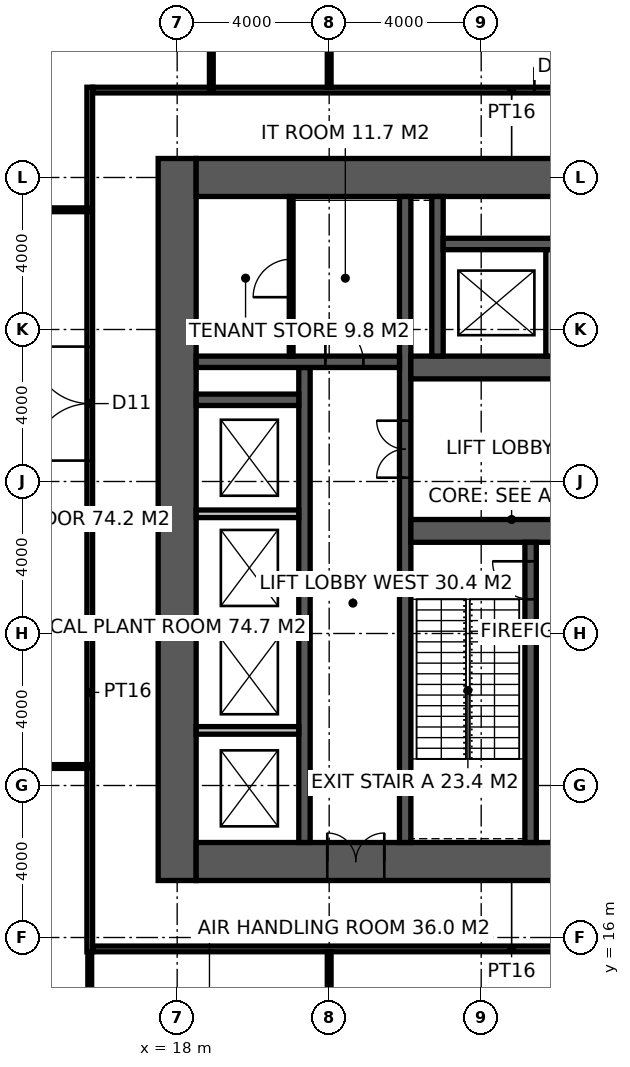
"""IFC4 building model, lengths in metres.
Left out: names, types, materials, properties, quantities, classifications, styles, units other than length and angle.
Written with IfcOpenShell. Run it as: python <this file> out.ifc"""

import sys

from ifc_helpers import new_model, si_unit, direction, frame, frame_2d, origin, place, context, subcontext, project, spatial, rectangle, extrude, element, fill, save


model = new_model("IFC4")
c1 = context("Model", 3, precision=1e-05, world=origin(), true_north=direction((0.0, 1.0)))
c2 = subcontext(c1, "Body", "Model", "MODEL_VIEW")
j1 = project(units=[si_unit("LENGTHUNIT", "METRE"), si_unit("PLANEANGLEUNIT", "RADIAN")], contexts=[c1])
p1 = place(None, origin())
s1 = spatial("IfcSite", under=j1, at=p1, CompositionType="ELEMENT")
p2 = place(p1, origin())
s2 = spatial("IfcBuilding", under=s1, at=p2, CompositionType="ELEMENT")
p3 = place(p2, frame((0.0, 0.0, 71.0)))
s3 = spatial("IfcBuildingStorey", under=s2, at=p3, CompositionType="ELEMENT", Elevation=71.0)
p4 = place(p3, frame((18.0, 17.5, -0.15), z_axis=(0.0, 0.0, 1.0), x_axis=(0.0, 1.0, 0.0)))
e1 = element("IfcWall", 1, at=p4, inside=s3, PredefinedType="SHEAR", context=c2, shape_type="SweptSolid", body=[
    extrude(rectangle(XDim=19.0, YDim=1.0, at=frame_2d((9.5, 0.0))), origin(), (0.0, 0.0, 1.0), 5.4),
])
p5 = place(p3, frame((18.5, 18.0, -0.15), z_axis=(0.0, 0.0, 1.0), x_axis=(1.0, 0.0, 0.0)))
e2 = element("IfcWall", 2, at=p5, inside=s3, PredefinedType="SHEAR", context=c2, shape_type="SweptSolid", body=[
    extrude(rectangle(XDim=17.6, YDim=1.0, at=frame_2d((8.8, 0.0))), origin(), (0.0, 0.0, 1.0), 5.4),
])
p6 = place(p5, frame((3.45, 0.0, 0.15)))
e3 = element("IfcOpeningElement", 3, at=p6, cuts=e2, PredefinedType="OPENING", context=c2, shape_type="SweptSolid", body=[
    extrude(rectangle(XDim=1.5, YDim=2.4, at=frame_2d((0.75, 1.2))), frame((0.0, 0.51, 0.0), z_axis=(0.0, -1.0, 0.0), x_axis=(1.0, 0.0, 0.0)), (0.0, 0.0, 1.0), 1.02),
])
p7 = place(p3, frame((18.5, 36.0, -0.15), z_axis=(0.0, 0.0, 1.0), x_axis=(1.0, 0.0, 0.0)))
e4 = element("IfcWall", 4, at=p7, inside=s3, PredefinedType="SHEAR", context=c2, shape_type="SweptSolid", body=[
    extrude(rectangle(XDim=17.6, YDim=1.0, at=frame_2d((8.8, 0.0))), origin(), (0.0, 0.0, 1.0), 5.4),
])
p8 = place(p3, frame((24.0, 18.5, -0.15), z_axis=(0.0, 0.0, 1.0), x_axis=(0.0, 1.0, 0.0)))
e5 = element("IfcWall", 5, at=p8, inside=s3, PredefinedType="SHEAR", context=c2, shape_type="SweptSolid", body=[
    extrude(rectangle(XDim=17.0, YDim=0.3, at=frame_2d((8.5, 0.0))), origin(), (0.0, 0.0, 1.0), 5.4),
])
p9 = place(p8, frame((9.6, 0.0, 0.15)))
e6 = element("IfcOpeningElement", 6, at=p9, cuts=e5, PredefinedType="OPENING", context=c2, shape_type="SweptSolid", body=[
    extrude(rectangle(XDim=1.5, YDim=2.4, at=frame_2d((0.75, 1.2))), frame((0.0, 0.16, 0.0), z_axis=(0.0, -1.0, 0.0), x_axis=(1.0, 0.0, 0.0)), (0.0, 0.0, 1.0), 0.32),
])
p10 = place(p3, frame((24.15, 26.7, -0.15), z_axis=(0.0, 0.0, 1.0), x_axis=(1.0, 0.0, 0.0)))
e7 = element("IfcWall", 7, at=p10, inside=s3, PredefinedType="SHEAR", context=c2, shape_type="SweptSolid", body=[
    extrude(rectangle(XDim=11.25, YDim=0.6, at=frame_2d((5.625, 0.0))), origin(), (0.0, 0.0, 1.0), 5.4),
])
p11 = place(p10, frame((9.25, 0.0, 0.15)))
e8 = element("IfcOpeningElement", 8, at=p11, cuts=e7, PredefinedType="OPENING", context=c2, shape_type="SweptSolid", body=[
    extrude(rectangle(XDim=1.0, YDim=2.2, at=frame_2d((0.5, 1.1))), frame((0.0, 0.31, 0.0), z_axis=(0.0, -1.0, 0.0), x_axis=(1.0, 0.0, 0.0)), (0.0, 0.0, 1.0), 0.62),
])
p12 = place(p10, frame((4.9, 0.0, 0.15)))
e9 = element("IfcOpeningElement", 9, at=p12, cuts=e7, PredefinedType="OPENING", context=c2, shape_type="SweptSolid", body=[
    extrude(rectangle(XDim=1.5, YDim=2.4, at=frame_2d((0.75, 1.2))), frame((0.0, 0.31, 0.0), z_axis=(0.0, -1.0, 0.0), x_axis=(1.0, 0.0, 0.0)), (0.0, 0.0, 1.0), 0.62),
])
p13 = place(p3, frame((27.3, 18.5, -0.15), z_axis=(0.0, 0.0, 1.0), x_axis=(0.0, 1.0, 0.0)))
e10 = element("IfcWall", 10, at=p13, inside=s3, PredefinedType="SHEAR", context=c2, shape_type="SweptSolid", body=[
    extrude(rectangle(XDim=7.9, YDim=0.3, at=frame_2d((3.95, 0.0))), origin(), (0.0, 0.0, 1.0), 5.4),
])
p14 = place(p13, frame((6.4, 0.0, 0.15)))
e11 = element("IfcOpeningElement", 11, at=p14, cuts=e10, PredefinedType="OPENING", context=c2, shape_type="SweptSolid", body=[
    extrude(rectangle(XDim=1.0, YDim=2.2, at=frame_2d((0.5, 1.1))), frame((0.0, 0.16, 0.0), z_axis=(0.0, -1.0, 0.0), x_axis=(1.0, 0.0, 0.0)), (0.0, 0.0, 1.0), 0.32),
])
p15 = place(p3, frame((24.15, 31.0, -0.15), z_axis=(0.0, 0.0, 1.0), x_axis=(1.0, 0.0, 0.0)))
e12 = element("IfcWall", 12, at=p15, inside=s3, PredefinedType="SHEAR", context=c2, shape_type="SweptSolid", body=[
    extrude(rectangle(XDim=11.25, YDim=0.6, at=frame_2d((5.625, 0.0))), origin(), (0.0, 0.0, 1.0), 5.4),
])
p16 = place(p15, frame((7.25, 0.0, 0.15)))
e13 = element("IfcOpeningElement", 13, at=p16, cuts=e12, PredefinedType="OPENING", context=c2, shape_type="SweptSolid", body=[
    extrude(rectangle(XDim=1.4, YDim=2.4, at=frame_2d((0.7, 1.2))), frame((0.0, 0.31, 0.0), z_axis=(0.0, -1.0, 0.0), x_axis=(1.0, 0.0, 0.0)), (0.0, 0.0, 1.0), 0.62),
])
p17 = place(p3, frame((21.35, 18.5, -0.15), z_axis=(0.0, 0.0, 1.0), x_axis=(0.0, 1.0, 0.0)))
e14 = element("IfcWall", 14, at=p17, inside=s3, PredefinedType="SHEAR", context=c2, shape_type="SweptSolid", body=[
    extrude(rectangle(XDim=12.5, YDim=0.3, at=frame_2d((6.25, 0.0))), origin(), (0.0, 0.0, 1.0), 5.4),
])
p18 = place(p3, frame((18.5, 31.15, -0.15), z_axis=(0.0, 0.0, 1.0), x_axis=(1.0, 0.0, 0.0)))
e15 = element("IfcWall", 15, at=p18, inside=s3, PredefinedType="SHEAR", context=c2, shape_type="SweptSolid", body=[
    extrude(rectangle(XDim=5.35, YDim=0.3, at=frame_2d((2.675, 0.0))), origin(), (0.0, 0.0, 1.0), 5.4),
])
p19 = place(p18, frame((3.4, 0.0, 0.15)))
e16 = element("IfcOpeningElement", 16, at=p19, cuts=e15, PredefinedType="OPENING", context=c2, shape_type="SweptSolid", body=[
    extrude(rectangle(XDim=1.0, YDim=2.2, at=frame_2d((0.5, 1.1))), frame((0.0, 0.16, 0.0), z_axis=(0.0, -1.0, 0.0), x_axis=(1.0, 0.0, 0.0)), (0.0, 0.0, 1.0), 0.32),
])
p20 = place(p3, frame((18.5, 30.15, -0.15), z_axis=(0.0, 0.0, 1.0), x_axis=(1.0, 0.0, 0.0)))
e17 = element("IfcWall", 17, at=p20, inside=s3, PredefinedType="SHEAR", context=c2, shape_type="SweptSolid", body=[
    extrude(rectangle(XDim=2.7, YDim=0.3, at=frame_2d((1.35, 0.0))), origin(), (0.0, 0.0, 1.0), 5.4),
])
p21 = place(p3, frame((24.85, 31.3, -0.15), z_axis=(0.0, 0.0, 1.0), x_axis=(0.0, 1.0, 0.0)))
e18 = element("IfcWall", 18, at=p21, inside=s3, PredefinedType="SHEAR", context=c2, shape_type="SweptSolid", body=[
    extrude(rectangle(XDim=4.2, YDim=0.3, at=frame_2d((2.1, 0.0))), origin(), (0.0, 0.0, 1.0), 5.4),
])
p22 = place(p3, frame((25.0, 34.25, -0.15), z_axis=(0.0, 0.0, 1.0), x_axis=(1.0, 0.0, 0.0)))
e19 = element("IfcWall", 19, at=p22, inside=s3, PredefinedType="SHEAR", context=c2, shape_type="SweptSolid", body=[
    extrude(rectangle(XDim=8.6, YDim=0.3, at=frame_2d((4.3, 0.0))), origin(), (0.0, 0.0, 1.0), 5.4),
])
p23 = place(p3, frame((27.8, 31.3, -0.15), z_axis=(0.0, 0.0, 1.0), x_axis=(0.0, 1.0, 0.0)))
e20 = element("IfcWall", 20, at=p23, inside=s3, PredefinedType="SOLIDWALL", context=c2, shape_type="SweptSolid", body=[
    extrude(rectangle(XDim=2.8, YDim=0.2, at=frame_2d((1.4, 0.0))), origin(), (0.0, 0.0, 1.0), 5.4),
])
for number, where, z_axis, x_axis in (
    (21, (18.5, 21.45, 0.0), (0.0, 0.0, 1.0), (1.0, 0.0, 0.0)),
    (22, (18.5, 24.3, 0.0), (0.0, 0.0, 1.0), (1.0, 0.0, 0.0)),
    (23, (18.5, 27.15, 0.0), (0.0, 0.0, 1.0), (1.0, 0.0, 0.0)),
):
    element("IfcWall", number, at=place(p3, frame(where, z_axis=z_axis, x_axis=x_axis)), inside=s3, PredefinedType="SOLIDWALL", context=c2, shape_type="SweptSolid", body=[
        extrude(rectangle(XDim=2.7, YDim=0.2, at=frame_2d((1.35, 0.0))), origin(), (0.0, 0.0, 1.0), 5.25),
    ])
p24 = place(p3, frame((21.0, 31.3, 0.0), z_axis=(0.0, 0.0, 1.0), x_axis=(0.0, 1.0, 0.0)))
e24 = element("IfcWall", 24, at=p24, inside=s3, PredefinedType="PARTITIONING", context=c2, shape_type="SweptSolid", body=[
    extrude(rectangle(XDim=4.2, YDim=0.1, at=frame_2d((2.1, 0.0))), origin(), (0.0, 0.0, 1.0), 5.25),
])
p25 = place(p24, frame((1.55, 0.0, 0.0)))
e25 = element("IfcOpeningElement", 25, at=p25, cuts=e24, PredefinedType="OPENING", context=c2, shape_type="SweptSolid", body=[
    extrude(rectangle(XDim=1.0, YDim=2.2, at=frame_2d((0.5, 1.1))), frame((0.0, 0.06, 0.0), z_axis=(0.0, -1.0, 0.0), x_axis=(1.0, 0.0, 0.0)), (0.0, 0.0, 1.0), 0.12),
])
p26 = place(p3, frame((15.7, 15.625, 0.0), z_axis=(0.0, 0.0, 1.0), x_axis=(0.0, 1.0, 0.0)))
e26 = element("IfcWall", 26, at=p26, inside=s3, PredefinedType="PARTITIONING", context=c2, shape_type="SweptSolid", body=[
    extrude(rectangle(XDim=22.75, YDim=0.15, at=frame_2d((11.375, 0.0))), origin(), (0.0, 0.0, 1.0), 5.25),
])
p27 = place(p26, frame((12.925, 0.0, 0.0)))
e27 = element("IfcOpeningElement", 27, at=p27, cuts=e26, PredefinedType="OPENING", context=c2, shape_type="SweptSolid", body=[
    extrude(rectangle(XDim=3.0, YDim=3.3, at=frame_2d((1.5, 1.65))), frame((0.0, 0.085, 0.0), z_axis=(0.0, -1.0, 0.0), x_axis=(1.0, 0.0, 0.0)), (0.0, 0.0, 1.0), 0.17),
])
p28 = place(p3, frame((15.775, 15.7, 0.0), z_axis=(0.0, 0.0, 1.0), x_axis=(1.0, 0.0, 0.0)))
e28 = element("IfcWall", 28, at=p28, inside=s3, PredefinedType="PARTITIONING", context=c2, shape_type="SweptSolid", body=[
    extrude(rectangle(XDim=22.05, YDim=0.15, at=frame_2d((11.025, 0.0))), origin(), (0.0, 0.0, 1.0), 5.25),
])
p29 = place(p3, frame((15.775, 38.3, 0.0), z_axis=(0.0, 0.0, 1.0), x_axis=(1.0, 0.0, 0.0)))
e29 = element("IfcWall", 29, at=p29, inside=s3, PredefinedType="PARTITIONING", context=c2, shape_type="SweptSolid", body=[
    extrude(rectangle(XDim=22.05, YDim=0.15, at=frame_2d((11.025, 0.0))), origin(), (0.0, 0.0, 1.0), 5.25),
])
p30 = place(p29, frame((11.625, 0.0, 0.0)))
e30 = element("IfcOpeningElement", 30, at=p30, cuts=e29, PredefinedType="OPENING", context=c2, shape_type="SweptSolid", body=[
    extrude(rectangle(XDim=1.2, YDim=2.2, at=frame_2d((0.6, 1.1))), frame((0.0, 0.085, 0.0), z_axis=(0.0, -1.0, 0.0), x_axis=(1.0, 0.0, 0.0)), (0.0, 0.0, 1.0), 0.17),
])
p31 = place(p3, frame((22.0, 38.375, 0.0), z_axis=(0.0, 0.0, 1.0), x_axis=(0.0, 1.0, 0.0)))
e31 = element("IfcWall", 31, at=p31, inside=s3, PredefinedType="PARTITIONING", context=c2, shape_type="SweptSolid", body=[
    extrude(rectangle(XDim=3.675, YDim=0.1, at=frame_2d((1.837, 0.0))), origin(), (0.0, 0.0, 1.0), 4.35),
])
p32 = place(p3, frame((15.7, 9.75, 0.0), z_axis=(0.0, 0.0, 1.0), x_axis=(0.0, 1.0, 0.0)))
e32 = element("IfcWall", 32, at=p32, inside=s3, PredefinedType="PARTITIONING", context=c2, shape_type="SweptSolid", body=[
    extrude(rectangle(XDim=5.875, YDim=0.1, at=frame_2d((2.938, 0.0))), origin(), (0.0, 0.0, 1.0), 5.25),
])
p33 = place(p3, frame((22.0, 9.75, 0.0), z_axis=(0.0, 0.0, 1.0), x_axis=(0.0, 1.0, 0.0)))
e33 = element("IfcWall", 33, at=p33, inside=s3, PredefinedType="PARTITIONING", context=c2, shape_type="SweptSolid", body=[
    extrude(rectangle(XDim=5.875, YDim=0.1, at=frame_2d((2.938, 0.0))), origin(), (0.0, 0.0, 1.0), 4.35),
])
p34 = place(p3, frame((10.68, 20.5, 0.0), z_axis=(0.0, 0.0, 1.0), x_axis=(1.0, 0.0, 0.0)))
e34 = element("IfcWall", 34, at=p34, inside=s3, PredefinedType="PARTITIONING", context=c2, shape_type="SweptSolid", body=[
    extrude(rectangle(XDim=5.02, YDim=0.1, at=frame_2d((2.51, 0.0))), origin(), (0.0, 0.0, 1.0), 4.05),
])
p35 = place(p34, frame((1.51, 0.0, 0.0)))
e35 = element("IfcOpeningElement", 35, at=p35, cuts=e34, PredefinedType="OPENING", context=c2, shape_type="SweptSolid", body=[
    extrude(rectangle(XDim=2.0, YDim=2.4, at=frame_2d((1.0, 1.2))), frame((0.0, 0.06, 0.0), z_axis=(0.0, -1.0, 0.0), x_axis=(1.0, 0.0, 0.0)), (0.0, 0.0, 1.0), 0.12),
])
p36 = place(p3, frame((10.68, 35.15, 0.0), z_axis=(0.0, 0.0, 1.0), x_axis=(1.0, 0.0, 0.0)))
e36 = element("IfcWall", 36, at=p36, inside=s3, PredefinedType="PARTITIONING", context=c2, shape_type="SweptSolid", body=[
    extrude(rectangle(XDim=5.02, YDim=0.1, at=frame_2d((2.51, 0.0))), origin(), (0.0, 0.0, 1.0), 5.25),
])
p37 = place(p36, frame((1.51, 0.0, 0.0)))
e37 = element("IfcOpeningElement", 37, at=p37, cuts=e36, PredefinedType="OPENING", context=c2, shape_type="SweptSolid", body=[
    extrude(rectangle(XDim=2.0, YDim=2.4, at=frame_2d((1.0, 1.2))), frame((0.0, 0.06, 0.0), z_axis=(0.0, -1.0, 0.0), x_axis=(1.0, 0.0, 0.0)), (0.0, 0.0, 1.0), 0.12),
])
p38 = place(p3, frame((18.899, 47.32, 0.0), z_axis=(0.0, 0.0, 1.0), x_axis=(0.0, -1.0, 0.0)))
e38 = element("IfcWall", 38, at=p38, inside=s3, PredefinedType="PARTITIONING", context=c2, shape_type="SweptSolid", body=[
    extrude(rectangle(XDim=9.02, YDim=0.1, at=frame_2d((4.51, 0.0))), origin(), (0.0, 0.0, 1.0), 5.25),
])
p39 = place(p38, frame((3.91, 0.0, 0.0)))
e39 = element("IfcOpeningElement", 39, at=p39, cuts=e38, PredefinedType="OPENING", context=c2, shape_type="SweptSolid", body=[
    extrude(rectangle(XDim=2.0, YDim=2.4, at=frame_2d((1.0, 1.2))), frame((0.0, 0.06, 0.0), z_axis=(0.0, -1.0, 0.0), x_axis=(1.0, 0.0, 0.0)), (0.0, 0.0, 1.0), 0.12),
])
p40 = place(p14, origin())
e40 = element("IfcDoor", 40, at=p40, inside=s3, OperationType="SINGLE_SWING_RIGHT", PredefinedType="DOOR", context=c2, shape_type="SweptSolid", body=[
    extrude(rectangle(XDim=1.0, YDim=2.2, at=frame_2d((0.5, 1.1))), frame((0.0, 0.025, 0.0), z_axis=(0.0, -1.0, 0.0), x_axis=(1.0, 0.0, 0.0)), (0.0, 0.0, 1.0), 0.05),
])
fill(e11, e40)
p41 = place(p9, origin())
e41 = element("IfcDoor", 41, at=p41, inside=s3, OperationType="DOUBLE_DOOR_DOUBLE_SWING", PredefinedType="DOOR", context=c2, shape_type="SweptSolid", body=[
    extrude(rectangle(XDim=1.5, YDim=2.4, at=frame_2d((0.75, 1.2))), frame((0.0, 0.025, 0.0), z_axis=(0.0, -1.0, 0.0), x_axis=(1.0, 0.0, 0.0)), (0.0, 0.0, 1.0), 0.05),
])
fill(e6, e41)
p42 = place(p19, origin())
e42 = element("IfcDoor", 42, at=p42, inside=s3, OperationType="SINGLE_SWING_LEFT", PredefinedType="DOOR", context=c2, shape_type="SweptSolid", body=[
    extrude(rectangle(XDim=1.0, YDim=2.2, at=frame_2d((0.5, 1.1))), frame((0.0, 0.025, 0.0), z_axis=(0.0, -1.0, 0.0), x_axis=(1.0, 0.0, 0.0)), (0.0, 0.0, 1.0), 0.05),
])
fill(e16, e42)
p43 = place(p25, origin())
e43 = element("IfcDoor", 43, at=p43, inside=s3, OperationType="SINGLE_SWING_LEFT", PredefinedType="DOOR", context=c2, shape_type="SweptSolid", body=[
    extrude(rectangle(XDim=1.0, YDim=2.2, at=frame_2d((0.5, 1.1))), frame((0.0, 0.025, 0.0), z_axis=(0.0, -1.0, 0.0), x_axis=(1.0, 0.0, 0.0)), (0.0, 0.0, 1.0), 0.05),
])
fill(e25, e43)
p44 = place(p6, origin())
e44 = element("IfcDoor", 44, at=p44, inside=s3, OperationType="DOUBLE_DOOR_DOUBLE_SWING", PredefinedType="DOOR", context=c2, shape_type="SweptSolid", body=[
    extrude(rectangle(XDim=1.5, YDim=2.4, at=frame_2d((0.75, 1.2))), frame((0.0, 0.025, 0.0), z_axis=(0.0, -1.0, 0.0), x_axis=(1.0, 0.0, 0.0)), (0.0, 0.0, 1.0), 0.05),
])
fill(e3, e44)
p45 = place(p30, origin())
e45 = element("IfcDoor", 45, at=p45, inside=s3, OperationType="DOUBLE_DOOR_DOUBLE_SWING", PredefinedType="DOOR", context=c2, shape_type="SweptSolid", body=[
    extrude(rectangle(XDim=1.2, YDim=2.2, at=frame_2d((0.6, 1.1))), frame((0.0, 0.025, 0.0), z_axis=(0.0, -1.0, 0.0), x_axis=(1.0, 0.0, 0.0)), (0.0, 0.0, 1.0), 0.05),
])
fill(e30, e45)
p46 = place(p27, origin())
e46 = element("IfcDoor", 46, at=p46, inside=s3, OperationType="DOUBLE_DOOR_DOUBLE_SWING", PredefinedType="DOOR", context=c2, shape_type="SweptSolid", body=[
    extrude(rectangle(XDim=3.0, YDim=3.3, at=frame_2d((1.5, 1.65))), frame((0.0, 0.025, 0.0), z_axis=(0.0, -1.0, 0.0), x_axis=(1.0, 0.0, 0.0)), (0.0, 0.0, 1.0), 0.05),
])
fill(e27, e46)
save(model, sys.argv[1])
